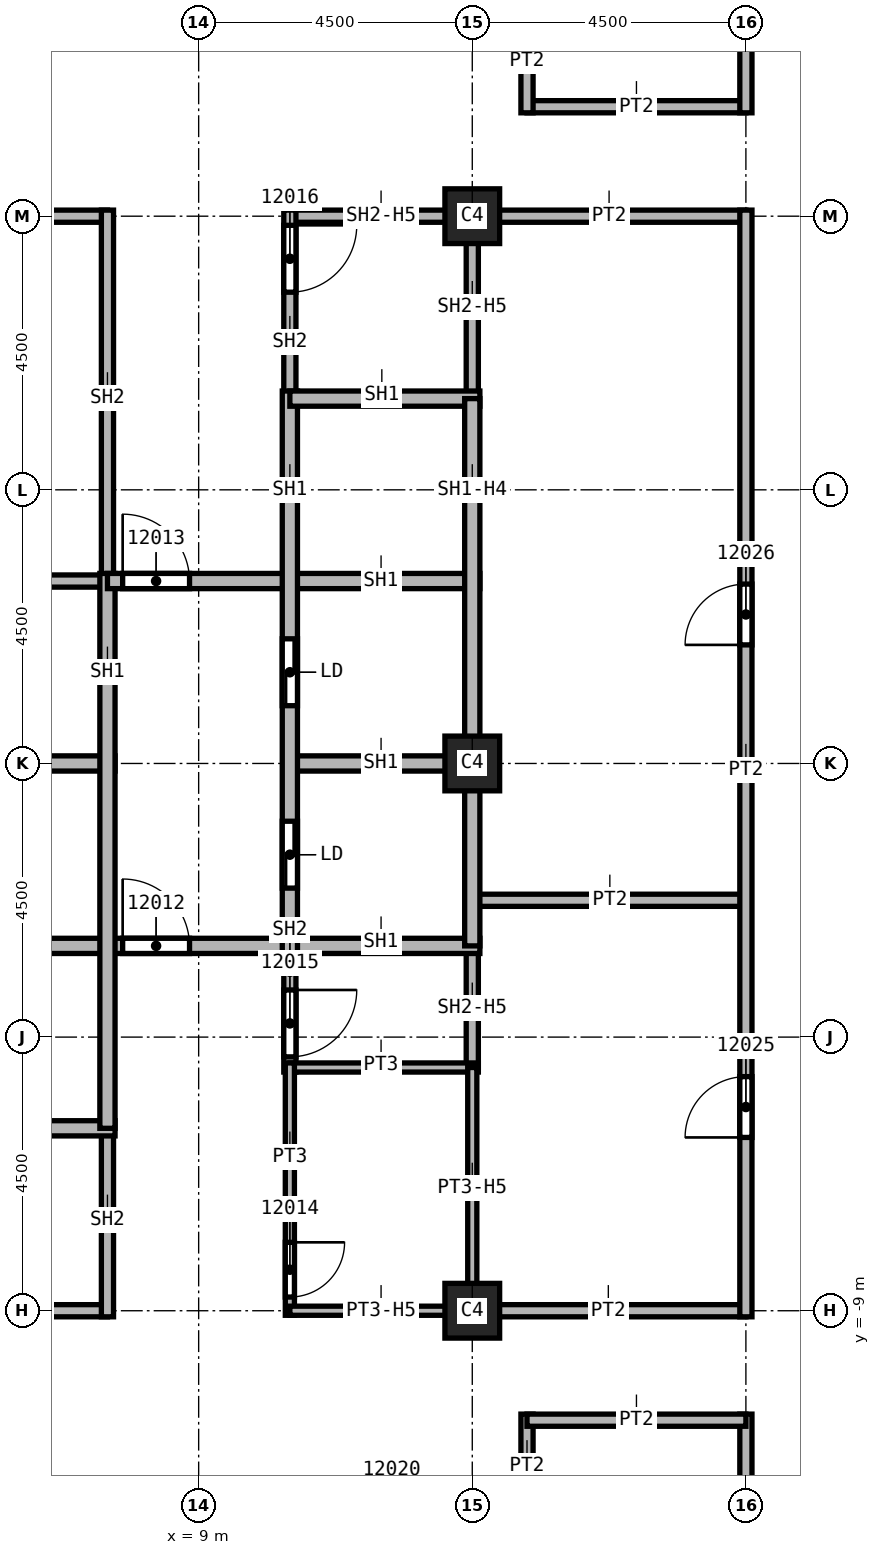
"""IFC4 building model, lengths in metres.
Left out: names, types, materials, properties, quantities, classifications, styles, units other than length and angle.
Written with IfcOpenShell. Run it as: python <this file> out.ifc"""

import sys

from ifc_helpers import new_model, si_unit, direction, frame, frame_2d, origin, origin_2d, place, context, subcontext, project, spatial, rectangle, extrude, element, fill, save


model = new_model("IFC4")
c1 = context("Model", 3, precision=1e-05, world=origin(), true_north=direction((0.0, 1.0)))
c2 = subcontext(c1, "Body", "Model", "MODEL_VIEW")
j1 = project(units=[si_unit("LENGTHUNIT", "METRE"), si_unit("PLANEANGLEUNIT", "RADIAN")], contexts=[c1])
p1 = place(None, origin())
s1 = spatial("IfcSite", under=j1, at=p1, CompositionType="ELEMENT")
p2 = place(p1, origin())
s2 = spatial("IfcBuilding", under=s1, at=p2, CompositionType="ELEMENT")
p3 = place(p2, frame((0.0, 0.0, 196.0)))
s3 = spatial("IfcBuildingStorey", under=s2, at=p3, CompositionType="ELEMENT", Elevation=196.0)
for number, where, z_axis, x_axis in (
    (1, (13.5, 0.0, 0.0), (0.0, 0.0, 1.0), (1.0, 0.0, 0.0)),
    (2, (13.5, 9.0, 0.0), (0.0, 0.0, 1.0), (1.0, 0.0, 0.0)),
    (3, (13.5, -9.0, 0.0), (0.0, 0.0, 1.0), (1.0, 0.0, 0.0)),
):
    element("IfcColumn", number, at=place(p3, frame(where, z_axis=z_axis, x_axis=x_axis)), inside=s3, PredefinedType="COLUMN", context=c2, shape_type="SweptSolid", body=[
        extrude(rectangle(XDim=0.9, YDim=0.9, at=origin_2d()), origin(), (0.0, 0.0, 1.0), 3.72),
    ])
for number, where, z_axis, x_axis in (
    (4, (13.5, -9.0, 0.0), (0.0, 0.0, 1.0), (1.0, 0.0, 0.0)),
    (5, (13.5, -2.25, 0.0), (0.0, 0.0, 1.0), (1.0, 0.0, 0.0)),
):
    element("IfcWall", number, at=place(p3, frame(where, z_axis=z_axis, x_axis=x_axis)), inside=s3, PredefinedType="PARTITIONING", context=c2, shape_type="SweptSolid", body=[
        extrude(rectangle(XDim=4.5, YDim=0.2, at=frame_2d((2.25, 0.0))), origin(), (0.0, 0.0, 1.0), 3.72),
    ])
p4 = place(p3, frame((14.4, -10.7, 0.0), z_axis=(0.0, 0.0, 1.0), x_axis=(0.0, -1.0, 0.0)))
e6 = element("IfcWall", 6, at=p4, inside=s3, PredefinedType="PARTITIONING", context=c2, shape_type="SweptSolid", body=[
    extrude(rectangle(XDim=1.7, YDim=0.2, at=frame_2d((0.85, 0.0))), origin(), (0.0, 0.0, 1.0), 3.72),
])
p5 = place(p3, frame((18.0, 9.0, 0.0), z_axis=(0.0, 0.0, 1.0), x_axis=(-1.0, 0.0, 0.0)))
e7 = element("IfcWall", 7, at=p5, inside=s3, PredefinedType="PARTITIONING", context=c2, shape_type="SweptSolid", body=[
    extrude(rectangle(XDim=4.5, YDim=0.2, at=frame_2d((2.25, 0.0))), origin(), (0.0, 0.0, 1.0), 3.72),
])
p6 = place(p3, frame((14.4, 10.8, 0.0), z_axis=(0.0, 0.0, 1.0), x_axis=(1.0, 0.0, 0.0)))
e8 = element("IfcWall", 8, at=p6, inside=s3, PredefinedType="PARTITIONING", context=c2, shape_type="SweptSolid", body=[
    extrude(rectangle(XDim=3.6, YDim=0.2, at=frame_2d((1.8, 0.0))), origin(), (0.0, 0.0, 1.0), 3.72),
])
p7 = place(p3, frame((14.4, 12.3, 0.0), z_axis=(0.0, 0.0, 1.0), x_axis=(0.0, -1.0, 0.0)))
e9 = element("IfcWall", 9, at=p7, inside=s3, PredefinedType="PARTITIONING", context=c2, shape_type="SweptSolid", body=[
    extrude(rectangle(XDim=1.6, YDim=0.2, at=frame_2d((0.8, 0.0))), origin(), (0.0, 0.0, 1.0), 3.72),
])
p8 = place(p3, frame((18.0, -22.3, 0.0), z_axis=(0.0, 0.0, 1.0), x_axis=(0.0, 1.0, 0.0)))
e10 = element("IfcWall", 10, at=p8, inside=s3, PredefinedType="PARTITIONING", context=c2, shape_type="SweptSolid", body=[
    extrude(rectangle(XDim=11.6, YDim=0.2, at=frame_2d((5.8, 0.0))), origin(), (0.0, 0.0, 1.0), 3.72),
])
p9 = place(p8, frame((6.25, 0.0, 0.0)))
e11 = element("IfcOpeningElement", 11, at=p9, cuts=e10, PredefinedType="OPENING", context=c2, shape_type="SweptSolid", body=[
    extrude(rectangle(XDim=1.0, YDim=2.1, at=frame_2d((0.5, 1.05))), frame((0.0, 0.1, 0.0), z_axis=(0.0, -1.0, 0.0), x_axis=(1.0, 0.0, 0.0)), (0.0, 0.0, 1.0), 0.2),
])
p10 = place(p3, frame((18.0, -10.8, 0.0), z_axis=(0.0, 0.0, 1.0), x_axis=(-1.0, 0.0, 0.0)))
e12 = element("IfcWall", 12, at=p10, inside=s3, PredefinedType="PARTITIONING", context=c2, shape_type="SweptSolid", body=[
    extrude(rectangle(XDim=3.6, YDim=0.2, at=frame_2d((1.8, 0.0))), origin(), (0.0, 0.0, 1.0), 3.72),
])
p11 = place(p3, frame((18.0, -9.1, 0.0), z_axis=(0.0, 0.0, 1.0), x_axis=(0.0, 1.0, 0.0)))
e13 = element("IfcWall", 13, at=p11, inside=s3, PredefinedType="PARTITIONING", context=c2, shape_type="SweptSolid", body=[
    extrude(rectangle(XDim=18.2, YDim=0.2, at=frame_2d((9.1, 0.0))), origin(), (0.0, 0.0, 1.0), 3.72),
])
p12 = place(p11, frame((2.95, 0.0, 0.0)))
e14 = element("IfcOpeningElement", 14, at=p12, cuts=e13, PredefinedType="OPENING", context=c2, shape_type="SweptSolid", body=[
    extrude(rectangle(XDim=1.0, YDim=2.1, at=frame_2d((0.5, 1.05))), frame((0.0, 0.1, 0.0), z_axis=(0.0, -1.0, 0.0), x_axis=(1.0, 0.0, 0.0)), (0.0, 0.0, 1.0), 0.2),
])
p13 = place(p11, frame((11.05, 0.0, 0.0)))
e15 = element("IfcOpeningElement", 15, at=p13, cuts=e13, PredefinedType="OPENING", context=c2, shape_type="SweptSolid", body=[
    extrude(rectangle(XDim=1.0, YDim=2.1, at=frame_2d((0.5, 1.05))), frame((0.0, 0.1, 0.0), z_axis=(0.0, -1.0, 0.0), x_axis=(1.0, 0.0, 0.0)), (0.0, 0.0, 1.0), 0.2),
])
p14 = place(p3, frame((18.0, 10.7, 0.0), z_axis=(0.0, 0.0, 1.0), x_axis=(0.0, 1.0, 0.0)))
e16 = element("IfcWall", 16, at=p14, inside=s3, PredefinedType="PARTITIONING", context=c2, shape_type="SweptSolid", body=[
    extrude(rectangle(XDim=11.6, YDim=0.2, at=frame_2d((5.8, 0.0))), origin(), (0.0, 0.0, 1.0), 3.72),
])
p15 = place(p14, frame((3.35, 0.0, 0.0)))
e17 = element("IfcOpeningElement", 17, at=p15, cuts=e16, PredefinedType="OPENING", context=c2, shape_type="SweptSolid", body=[
    extrude(rectangle(XDim=1.0, YDim=2.1, at=frame_2d((0.5, 1.05))), frame((0.0, 0.1, 0.0), z_axis=(0.0, -1.0, 0.0), x_axis=(1.0, 0.0, 0.0)), (0.0, 0.0, 1.0), 0.2),
])
p16 = place(p3, frame((4.4, 3.0, 0.0), z_axis=(0.0, 0.0, 1.0), x_axis=(1.0, 0.0, 0.0)))
e18 = element("IfcWall", 18, at=p16, inside=s3, PredefinedType="SOLIDWALL", context=c2, shape_type="SweptSolid", body=[
    extrude(rectangle(XDim=3.225, YDim=0.2, at=frame_2d((1.613, 0.0))), origin(), (0.0, 0.0, 1.0), 3.72),
])
for number, where, z_axis, x_axis in (
    (19, (4.5, 9.0, 0.0), (0.0, 0.0, 1.0), (1.0, 0.0, 0.0)),
    (20, (7.5, -9.0, 0.0), (0.0, 0.0, 1.0), (-1.0, 0.0, 0.0)),
):
    element("IfcWall", number, at=place(p3, frame(where, z_axis=z_axis, x_axis=x_axis)), inside=s3, PredefinedType="SOLIDWALL", context=c2, shape_type="SweptSolid", body=[
        extrude(rectangle(XDim=3.0, YDim=0.2, at=frame_2d((1.5, 0.0))), origin(), (0.0, 0.0, 1.0), 2.958),
    ])
p17 = place(p3, frame((7.5, -6.0, 0.0), z_axis=(0.0, 0.0, 1.0), x_axis=(0.0, -1.0, 0.0)))
e21 = element("IfcWall", 21, at=p17, inside=s3, PredefinedType="SOLIDWALL", context=c2, shape_type="SweptSolid", body=[
    extrude(rectangle(XDim=3.1, YDim=0.2, at=frame_2d((1.55, 0.0))), origin(), (0.0, 0.0, 1.0), 3.72),
])
p18 = place(p3, frame((7.5, 9.1, 0.0), z_axis=(0.0, 0.0, 1.0), x_axis=(0.0, -1.0, 0.0)))
e22 = element("IfcWall", 22, at=p18, inside=s3, PredefinedType="SOLIDWALL", context=c2, shape_type="SweptSolid", body=[
    extrude(rectangle(XDim=6.225, YDim=0.2, at=frame_2d((3.113, 0.0))), origin(), (0.0, 0.0, 1.0), 3.72),
])
p19 = place(p3, frame((10.5, -2.875, 0.0), z_axis=(0.0, 0.0, 1.0), x_axis=(0.0, -1.0, 0.0)))
e23 = element("IfcWall", 23, at=p19, inside=s3, PredefinedType="SOLIDWALL", context=c2, shape_type="SweptSolid", body=[
    extrude(rectangle(XDim=2.2, YDim=0.2, at=frame_2d((1.1, 0.0))), origin(), (0.0, 0.0, 1.0), 3.72),
])
p20 = place(p19, frame((0.85, 0.0, 0.0)))
e24 = element("IfcOpeningElement", 24, at=p20, cuts=e23, PredefinedType="OPENING", context=c2, shape_type="SweptSolid", body=[
    extrude(rectangle(XDim=1.1, YDim=2.1, at=frame_2d((0.55, 1.05))), frame((0.0, 0.1, 0.0), z_axis=(0.0, -1.0, 0.0), x_axis=(1.0, 0.0, 0.0)), (0.0, 0.0, 1.0), 0.2),
])
p21 = place(p3, frame((10.5, 9.0, 0.0), z_axis=(0.0, 0.0, 1.0), x_axis=(1.0, 0.0, 0.0)))
e25 = element("IfcWall", 25, at=p21, inside=s3, PredefinedType="SOLIDWALL", context=c2, shape_type="SweptSolid", body=[
    extrude(rectangle(XDim=3.1, YDim=0.2, at=frame_2d((1.55, 0.0))), origin(), (0.0, 0.0, 1.0), 2.958),
])
p22 = place(p3, frame((10.5, 9.1, 0.0), z_axis=(0.0, 0.0, 1.0), x_axis=(0.0, -1.0, 0.0)))
e26 = element("IfcWall", 26, at=p22, inside=s3, PredefinedType="SOLIDWALL", context=c2, shape_type="SweptSolid", body=[
    extrude(rectangle(XDim=3.225, YDim=0.2, at=frame_2d((1.613, 0.0))), origin(), (0.0, 0.0, 1.0), 3.72),
])
p23 = place(p22, frame((0.25, 0.0, 0.0)))
e27 = element("IfcOpeningElement", 27, at=p23, cuts=e26, PredefinedType="OPENING", context=c2, shape_type="SweptSolid", body=[
    extrude(rectangle(XDim=1.1, YDim=2.1, at=frame_2d((0.55, 1.05))), frame((0.0, 0.1, 0.0), z_axis=(0.0, -1.0, 0.0), x_axis=(1.0, 0.0, 0.0)), (0.0, 0.0, 1.0), 0.2),
])
p24 = place(p3, frame((13.5, -3.0, 0.0), z_axis=(0.0, 0.0, 1.0), x_axis=(0.0, -1.0, 0.0)))
e28 = element("IfcWall", 28, at=p24, inside=s3, PredefinedType="SOLIDWALL", context=c2, shape_type="SweptSolid", body=[
    extrude(rectangle(XDim=2.0, YDim=0.2, at=frame_2d((1.0, 0.0))), origin(), (0.0, 0.0, 1.0), 2.958),
])
p25 = place(p3, frame((13.5, 9.1, 0.0), z_axis=(0.0, 0.0, 1.0), x_axis=(0.0, -1.0, 0.0)))
e29 = element("IfcWall", 29, at=p25, inside=s3, PredefinedType="SOLIDWALL", context=c2, shape_type="SweptSolid", body=[
    extrude(rectangle(XDim=3.1, YDim=0.2, at=frame_2d((1.55, 0.0))), origin(), (0.0, 0.0, 1.0), 2.958),
])
p26 = place(p3, frame((4.375, -6.0, 0.0), z_axis=(0.0, 0.0, 1.0), x_axis=(1.0, 0.0, 0.0)))
e30 = element("IfcWall", 30, at=p26, inside=s3, PredefinedType="SOLIDWALL", context=c2, shape_type="SweptSolid", body=[
    extrude(rectangle(XDim=3.25, YDim=0.25, at=frame_2d((1.625, 0.0))), origin(), (0.0, 0.0, 1.0), 3.72),
])
p27 = place(p3, frame((4.375, -3.0, 0.0), z_axis=(0.0, 0.0, 1.0), x_axis=(1.0, 0.0, 0.0)))
e31 = element("IfcWall", 31, at=p27, inside=s3, PredefinedType="SOLIDWALL", context=c2, shape_type="SweptSolid", body=[
    extrude(rectangle(XDim=9.25, YDim=0.25, at=frame_2d((4.625, 0.0))), origin(), (0.0, 0.0, 1.0), 3.72),
])
p28 = place(p27, frame((3.375, 0.0, 0.0)))
e32 = element("IfcOpeningElement", 32, at=p28, cuts=e31, PredefinedType="OPENING", context=c2, shape_type="SweptSolid", body=[
    extrude(rectangle(XDim=1.1, YDim=2.1, at=frame_2d((0.55, 1.05))), frame((0.0, 0.125, 0.0), z_axis=(0.0, -1.0, 0.0), x_axis=(1.0, 0.0, 0.0)), (0.0, 0.0, 1.0), 0.25),
])
p29 = place(p3, frame((4.375, 0.0, 0.0), z_axis=(0.0, 0.0, 1.0), x_axis=(1.0, 0.0, 0.0)))
e33 = element("IfcWall", 33, at=p29, inside=s3, PredefinedType="SOLIDWALL", context=c2, shape_type="SweptSolid", body=[
    extrude(rectangle(XDim=3.25, YDim=0.25, at=frame_2d((1.625, 0.0))), origin(), (0.0, 0.0, 1.0), 3.72),
])
p30 = place(p3, frame((7.5, 3.125, 0.0), z_axis=(0.0, 0.0, 1.0), x_axis=(0.0, -1.0, 0.0)))
e34 = element("IfcWall", 34, at=p30, inside=s3, PredefinedType="SOLIDWALL", context=c2, shape_type="SweptSolid", body=[
    extrude(rectangle(XDim=9.125, YDim=0.25, at=frame_2d((4.562, 0.0))), origin(), (0.0, 0.0, 1.0), 3.72),
])
p31 = place(p3, frame((7.5, 3.0, 0.0), z_axis=(0.0, 0.0, 1.0), x_axis=(1.0, 0.0, 0.0)))
e35 = element("IfcWall", 35, at=p31, inside=s3, PredefinedType="SOLIDWALL", context=c2, shape_type="SweptSolid", body=[
    extrude(rectangle(XDim=6.125, YDim=0.25, at=frame_2d((3.062, 0.0))), origin(), (0.0, 0.0, 1.0), 3.72),
])
p32 = place(p31, frame((0.25, 0.0, 0.0)))
e36 = element("IfcOpeningElement", 36, at=p32, cuts=e35, PredefinedType="OPENING", context=c2, shape_type="SweptSolid", body=[
    extrude(rectangle(XDim=1.1, YDim=2.1, at=frame_2d((0.55, 1.05))), frame((0.0, 0.125, 0.0), z_axis=(0.0, -1.0, 0.0), x_axis=(1.0, 0.0, 0.0)), (0.0, 0.0, 1.0), 0.25),
])
p33 = place(p3, frame((10.5, 0.0, 0.0), z_axis=(0.0, 0.0, 1.0), x_axis=(1.0, 0.0, 0.0)))
e37 = element("IfcWall", 37, at=p33, inside=s3, PredefinedType="SOLIDWALL", context=c2, shape_type="SweptSolid", body=[
    extrude(rectangle(XDim=3.125, YDim=0.25, at=frame_2d((1.562, 0.0))), origin(), (0.0, 0.0, 1.0), 3.72),
])
p34 = place(p3, frame((10.5, 6.125, 0.0), z_axis=(0.0, 0.0, 1.0), x_axis=(0.0, -1.0, 0.0)))
e38 = element("IfcWall", 38, at=p34, inside=s3, PredefinedType="SOLIDWALL", context=c2, shape_type="SweptSolid", body=[
    extrude(rectangle(XDim=9.25, YDim=0.25, at=frame_2d((4.625, 0.0))), origin(), (0.0, 0.0, 1.0), 3.72),
])
p35 = place(p34, frame((7.075, 0.0, 0.0)))
e39 = element("IfcOpeningElement", 39, at=p35, cuts=e38, PredefinedType="OPENING", context=c2, shape_type="SweptSolid", body=[
    extrude(rectangle(XDim=1.1, YDim=2.1, at=frame_2d((0.55, 1.05))), frame((0.0, 0.125, 0.0), z_axis=(0.0, -1.0, 0.0), x_axis=(1.0, 0.0, 0.0)), (0.0, 0.0, 1.0), 0.25),
])
p36 = place(p34, frame((4.075, 0.0, 0.0)))
e40 = element("IfcOpeningElement", 40, at=p36, cuts=e38, PredefinedType="OPENING", context=c2, shape_type="SweptSolid", body=[
    extrude(rectangle(XDim=1.1, YDim=2.1, at=frame_2d((0.55, 1.05))), frame((0.0, 0.125, 0.0), z_axis=(0.0, -1.0, 0.0), x_axis=(1.0, 0.0, 0.0)), (0.0, 0.0, 1.0), 0.25),
])
p37 = place(p3, frame((10.5, 6.0, 0.0), z_axis=(0.0, 0.0, 1.0), x_axis=(1.0, 0.0, 0.0)))
e41 = element("IfcWall", 41, at=p37, inside=s3, PredefinedType="SOLIDWALL", context=c2, shape_type="SweptSolid", body=[
    extrude(rectangle(XDim=3.125, YDim=0.25, at=frame_2d((1.562, 0.0))), origin(), (0.0, 0.0, 1.0), 3.72),
])
p38 = place(p3, frame((13.5, 6.0, 0.0), z_axis=(0.0, 0.0, 1.0), x_axis=(0.0, -1.0, 0.0)))
e42 = element("IfcWall", 42, at=p38, inside=s3, PredefinedType="SOLIDWALL", context=c2, shape_type="SweptSolid", body=[
    extrude(rectangle(XDim=9.0, YDim=0.25, at=frame_2d((4.5, 0.0))), origin(), (0.0, 0.0, 1.0), 2.958),
])
p39 = place(p3, frame((10.5, -5.0, 0.0), z_axis=(0.0, 0.0, 1.0), x_axis=(1.0, 0.0, 0.0)))
e43 = element("IfcWall", 43, at=p39, inside=s3, PredefinedType="PARTITIONING", context=c2, shape_type="SweptSolid", body=[
    extrude(rectangle(XDim=3.1, YDim=0.15, at=frame_2d((1.55, 0.0))), origin(), (0.0, 0.0, 1.0), 3.72),
])
p40 = place(p3, frame((10.5, -4.925, 0.0), z_axis=(0.0, 0.0, 1.0), x_axis=(0.0, -1.0, 0.0)))
e44 = element("IfcWall", 44, at=p40, inside=s3, PredefinedType="PARTITIONING", context=c2, shape_type="SweptSolid", body=[
    extrude(rectangle(XDim=4.15, YDim=0.15, at=frame_2d((2.075, 0.0))), origin(), (0.0, 0.0, 1.0), 3.72),
])
p41 = place(p40, frame((2.95, 0.0, 0.0)))
e45 = element("IfcOpeningElement", 45, at=p41, cuts=e44, PredefinedType="OPENING", context=c2, shape_type="SweptSolid", body=[
    extrude(rectangle(XDim=0.9, YDim=2.1, at=frame_2d((0.45, 1.05))), frame((0.0, 0.075, 0.0), z_axis=(0.0, -1.0, 0.0), x_axis=(1.0, 0.0, 0.0)), (0.0, 0.0, 1.0), 0.15),
])
p42 = place(p3, frame((13.5, -5.0, 0.0), z_axis=(0.0, 0.0, 1.0), x_axis=(0.0, -1.0, 0.0)))
e46 = element("IfcWall", 46, at=p42, inside=s3, PredefinedType="PARTITIONING", context=c2, shape_type="SweptSolid", body=[
    extrude(rectangle(XDim=4.1, YDim=0.15, at=frame_2d((2.05, 0.0))), origin(), (0.0, 0.0, 1.0), 2.958),
])
p43 = place(p3, frame((13.575, -9.0, 0.0), z_axis=(0.0, 0.0, 1.0), x_axis=(-1.0, 0.0, 0.0)))
e47 = element("IfcWall", 47, at=p43, inside=s3, PredefinedType="PARTITIONING", context=c2, shape_type="SweptSolid", body=[
    extrude(rectangle(XDim=3.075, YDim=0.15, at=frame_2d((1.538, 0.0))), origin(), (0.0, 0.0, 1.0), 2.958),
])
p44 = place(p28, origin())
e48 = element("IfcDoor", 48, at=p44, inside=s3, OperationType="SINGLE_SWING_LEFT", PredefinedType="DOOR", context=c2, shape_type="SweptSolid", body=[
    extrude(rectangle(XDim=1.1, YDim=2.1, at=frame_2d((0.55, 1.05))), frame((0.0, 0.025, 0.0), z_axis=(0.0, -1.0, 0.0), x_axis=(1.0, 0.0, 0.0)), (0.0, 0.0, 1.0), 0.05),
])
fill(e32, e48)
p45 = place(p32, origin())
e49 = element("IfcDoor", 49, at=p45, inside=s3, OperationType="SINGLE_SWING_RIGHT", PredefinedType="DOOR", context=c2, shape_type="SweptSolid", body=[
    extrude(rectangle(XDim=1.1, YDim=2.1, at=frame_2d((0.55, 1.05))), frame((0.0, 0.025, 0.0), z_axis=(0.0, -1.0, 0.0), x_axis=(1.0, 0.0, 0.0)), (0.0, 0.0, 1.0), 0.05),
])
fill(e36, e49)
p46 = place(p41, origin())
e50 = element("IfcDoor", 50, at=p46, inside=s3, OperationType="SINGLE_SWING_LEFT", PredefinedType="DOOR", context=c2, shape_type="SweptSolid", body=[
    extrude(rectangle(XDim=0.9, YDim=2.1, at=frame_2d((0.45, 1.05))), frame((0.0, 0.025, 0.0), z_axis=(0.0, -1.0, 0.0), x_axis=(1.0, 0.0, 0.0)), (0.0, 0.0, 1.0), 0.05),
])
fill(e45, e50)
p47 = place(p20, origin())
e51 = element("IfcDoor", 51, at=p47, inside=s3, OperationType="SINGLE_SWING_RIGHT", PredefinedType="DOOR", context=c2, shape_type="SweptSolid", body=[
    extrude(rectangle(XDim=1.1, YDim=2.1, at=frame_2d((0.55, 1.05))), frame((0.0, 0.025, 0.0), z_axis=(0.0, -1.0, 0.0), x_axis=(1.0, 0.0, 0.0)), (0.0, 0.0, 1.0), 0.05),
])
fill(e24, e51)
p48 = place(p23, origin())
e52 = element("IfcDoor", 52, at=p48, inside=s3, OperationType="SINGLE_SWING_LEFT", PredefinedType="DOOR", context=c2, shape_type="SweptSolid", body=[
    extrude(rectangle(XDim=1.1, YDim=2.1, at=frame_2d((0.55, 1.05))), frame((0.0, 0.025, 0.0), z_axis=(0.0, -1.0, 0.0), x_axis=(1.0, 0.0, 0.0)), (0.0, 0.0, 1.0), 0.05),
])
fill(e27, e52)
p49 = place(p12, origin())
e53 = element("IfcDoor", 53, at=p49, inside=s3, OperationType="SINGLE_SWING_RIGHT", PredefinedType="DOOR", context=c2, shape_type="SweptSolid", body=[
    extrude(rectangle(XDim=1.0, YDim=2.1, at=frame_2d((0.5, 1.05))), frame((0.0, 0.025, 0.0), z_axis=(0.0, -1.0, 0.0), x_axis=(1.0, 0.0, 0.0)), (0.0, 0.0, 1.0), 0.05),
])
fill(e14, e53)
p50 = place(p13, origin())
e54 = element("IfcDoor", 54, at=p50, inside=s3, OperationType="SINGLE_SWING_LEFT", PredefinedType="DOOR", context=c2, shape_type="SweptSolid", body=[
    extrude(rectangle(XDim=1.0, YDim=2.1, at=frame_2d((0.5, 1.05))), frame((0.0, 0.025, 0.0), z_axis=(0.0, -1.0, 0.0), x_axis=(1.0, 0.0, 0.0)), (0.0, 0.0, 1.0), 0.05),
])
fill(e15, e54)
p51 = place(p35, origin())
e55 = element("IfcDoor", 55, at=p51, inside=s3, OperationType="SLIDING_TO_LEFT", PredefinedType="DOOR", context=c2, shape_type="SweptSolid", body=[
    extrude(rectangle(XDim=1.1, YDim=2.1, at=frame_2d((0.55, 1.05))), frame((0.0, 0.025, 0.0), z_axis=(0.0, -1.0, 0.0), x_axis=(1.0, 0.0, 0.0)), (0.0, 0.0, 1.0), 0.05),
])
fill(e39, e55)
p52 = place(p36, origin())
e56 = element("IfcDoor", 56, at=p52, inside=s3, OperationType="SLIDING_TO_LEFT", PredefinedType="DOOR", context=c2, shape_type="SweptSolid", body=[
    extrude(rectangle(XDim=1.1, YDim=2.1, at=frame_2d((0.55, 1.05))), frame((0.0, 0.025, 0.0), z_axis=(0.0, -1.0, 0.0), x_axis=(1.0, 0.0, 0.0)), (0.0, 0.0, 1.0), 0.05),
])
fill(e40, e56)
save(model, sys.argv[1])
